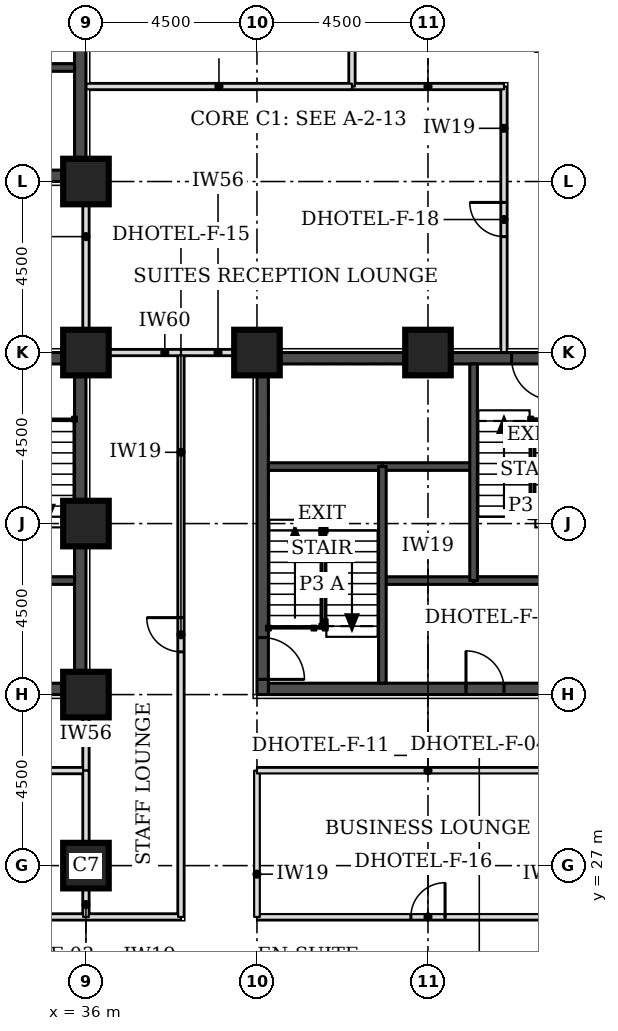
"""IFC4 building model, lengths in metres.
Left out: names, types, materials, properties, quantities, classifications, styles, units other than length and angle.
Written with IfcOpenShell. Run it as: python <this file> out.ifc"""

import sys

from ifc_helpers import new_model, si_unit, direction, frame, frame_2d, origin, origin_2d, place, context, subcontext, project, spatial, rectangle, extrude, element, fill, save


model = new_model("IFC4")
c1 = context("Model", 3, precision=1e-05, world=origin(), true_north=direction((0.0, 1.0)))
c2 = subcontext(c1, "Body", "Model", "MODEL_VIEW")
j1 = project(units=[si_unit("LENGTHUNIT", "METRE"), si_unit("PLANEANGLEUNIT", "RADIAN")], contexts=[c1])
p1 = place(None, origin())
s1 = spatial("IfcSite", under=j1, at=p1, CompositionType="ELEMENT")
p2 = place(p1, origin())
s2 = spatial("IfcBuilding", under=s1, at=p2, CompositionType="ELEMENT")
p3 = place(p2, frame((0.0, 0.0, 42.9)))
s3 = spatial("IfcBuildingStorey", under=s2, at=p3, CompositionType="ELEMENT", Elevation=42.9)
for number, where, z_axis, x_axis in (
    (1, (36.0, 27.0, 0.0), (0.0, 0.0, 1.0), (1.0, 0.0, 0.0)),
    (2, (36.0, 31.5, 0.0), (0.0, 0.0, 1.0), (1.0, 0.0, 0.0)),
    (3, (36.0, 36.0, 0.0), (0.0, 0.0, 1.0), (1.0, 0.0, 0.0)),
    (4, (36.0, 40.5, 0.0), (0.0, 0.0, 1.0), (1.0, 0.0, 0.0)),
    (5, (40.5, 40.5, 0.0), (0.0, 0.0, 1.0), (1.0, 0.0, 0.0)),
    (6, (45.0, 40.5, 0.0), (0.0, 0.0, 1.0), (1.0, 0.0, 0.0)),
    (7, (36.0, 45.0, 0.0), (0.0, 0.0, 1.0), (1.0, 0.0, 0.0)),
):
    element("IfcColumn", number, at=place(p3, frame(where, z_axis=z_axis, x_axis=x_axis)), inside=s3, PredefinedType="COLUMN", context=c2, shape_type="SweptSolid", body=[
        extrude(rectangle(XDim=1.2, YDim=1.2, at=origin_2d()), origin(), (0.0, 0.0, 1.0), 3.3),
    ])
p4 = place(p3, frame((27.3, 45.15, 0.0), z_axis=(0.0, 0.0, 1.0), x_axis=(1.0, 0.0, 0.0)))
e8 = element("IfcWall", 8, at=p4, inside=s3, PredefinedType="SHEAR", context=c2, shape_type="SweptSolid", body=[
    extrude(rectangle(XDim=8.4, YDim=0.3, at=frame_2d((4.2, 0.0))), origin(), (0.0, 0.0, 1.0), 3.3),
])
p5 = place(p4, frame((5.2, 0.0, 0.0)))
e9 = element("IfcOpeningElement", 9, at=p5, cuts=e8, PredefinedType="OPENING", context=c2, shape_type="SweptSolid", body=[
    extrude(rectangle(XDim=1.0, YDim=2.1, at=frame_2d((0.5, 1.05))), frame((0.0, 0.16, 0.0), z_axis=(0.0, -1.0, 0.0), x_axis=(1.0, 0.0, 0.0)), (0.0, 0.0, 1.0), 0.32),
])
p6 = place(p3, frame((35.85, 45.0, 0.0), z_axis=(0.0, 0.0, 1.0), x_axis=(0.0, 1.0, 0.0)))
e10 = element("IfcWall", 10, at=p6, inside=s3, PredefinedType="SHEAR", context=c2, shape_type="SweptSolid", body=[
    extrude(rectangle(XDim=9.0, YDim=0.3, at=frame_2d((4.5, 0.0))), origin(), (0.0, 0.0, 1.0), 3.3),
])
p7 = place(p3, frame((40.8, 31.65, 0.0), z_axis=(0.0, 0.0, 1.0), x_axis=(1.0, 0.0, 0.0)))
e11 = element("IfcWall", 11, at=p7, inside=s3, PredefinedType="SHEAR", context=c2, shape_type="SweptSolid", body=[
    extrude(rectangle(XDim=8.4, YDim=0.3, at=frame_2d((4.2, 0.0))), origin(), (0.0, 0.0, 1.0), 3.3),
])
p8 = place(p7, frame((5.2, 0.0, 0.0)))
e12 = element("IfcOpeningElement", 12, at=p8, cuts=e11, PredefinedType="OPENING", context=c2, shape_type="SweptSolid", body=[
    extrude(rectangle(XDim=1.0, YDim=2.1, at=frame_2d((0.5, 1.05))), frame((0.0, 0.16, 0.0), z_axis=(0.0, -1.0, 0.0), x_axis=(1.0, 0.0, 0.0)), (0.0, 0.0, 1.0), 0.32),
])
p9 = place(p3, frame((40.8, 40.35, 0.0), z_axis=(0.0, 0.0, 1.0), x_axis=(1.0, 0.0, 0.0)))
e13 = element("IfcWall", 13, at=p9, inside=s3, PredefinedType="SHEAR", context=c2, shape_type="SweptSolid", body=[
    extrude(rectangle(XDim=8.4, YDim=0.3, at=frame_2d((4.2, 0.0))), origin(), (0.0, 0.0, 1.0), 3.3),
])
p10 = place(p9, frame((6.4, 0.0, 0.0)))
e14 = element("IfcOpeningElement", 14, at=p10, cuts=e13, PredefinedType="OPENING", context=c2, shape_type="SweptSolid", body=[
    extrude(rectangle(XDim=1.1, YDim=2.1, at=frame_2d((0.55, 1.05))), frame((0.0, 0.16, 0.0), z_axis=(0.0, -1.0, 0.0), x_axis=(1.0, 0.0, 0.0)), (0.0, 0.0, 1.0), 0.32),
])
p11 = place(p3, frame((40.65, 31.5, 0.0), z_axis=(0.0, 0.0, 1.0), x_axis=(0.0, 1.0, 0.0)))
e15 = element("IfcWall", 15, at=p11, inside=s3, PredefinedType="SHEAR", context=c2, shape_type="SweptSolid", body=[
    extrude(rectangle(XDim=9.0, YDim=0.3, at=frame_2d((4.5, 0.0))), origin(), (0.0, 0.0, 1.0), 3.3),
])
p12 = place(p11, frame((0.4, 0.0, 0.0)))
e16 = element("IfcOpeningElement", 16, at=p12, cuts=e15, PredefinedType="OPENING", context=c2, shape_type="SweptSolid", body=[
    extrude(rectangle(XDim=1.1, YDim=2.1, at=frame_2d((0.55, 1.05))), frame((0.0, 0.16, 0.0), z_axis=(0.0, -1.0, 0.0), x_axis=(1.0, 0.0, 0.0)), (0.0, 0.0, 1.0), 0.32),
])
p13 = place(p3, frame((27.3, 31.65, 0.0), z_axis=(0.0, 0.0, 1.0), x_axis=(1.0, 0.0, 0.0)))
e17 = element("IfcWall", 17, at=p13, inside=s3, PredefinedType="SHEAR", context=c2, shape_type="SweptSolid", body=[
    extrude(rectangle(XDim=8.4, YDim=0.3, at=frame_2d((4.2, 0.0))), origin(), (0.0, 0.0, 1.0), 3.3),
])
p14 = place(p13, frame((4.8, 0.0, 0.0)))
e18 = element("IfcOpeningElement", 18, at=p14, cuts=e17, PredefinedType="OPENING", context=c2, shape_type="SweptSolid", body=[
    extrude(rectangle(XDim=1.8, YDim=2.1, at=frame_2d((0.9, 1.05))), frame((0.0, 0.16, 0.0), z_axis=(0.0, -1.0, 0.0), x_axis=(1.0, 0.0, 0.0)), (0.0, 0.0, 1.0), 0.32),
])
p15 = place(p3, frame((27.3, 40.35, 0.0), z_axis=(0.0, 0.0, 1.0), x_axis=(1.0, 0.0, 0.0)))
e19 = element("IfcWall", 19, at=p15, inside=s3, PredefinedType="SHEAR", context=c2, shape_type="SweptSolid", body=[
    extrude(rectangle(XDim=8.4, YDim=0.3, at=frame_2d((4.2, 0.0))), origin(), (0.0, 0.0, 1.0), 3.3),
])
p16 = place(p15, frame((6.4, 0.0, 0.0)))
e20 = element("IfcOpeningElement", 20, at=p16, cuts=e19, PredefinedType="OPENING", context=c2, shape_type="SweptSolid", body=[
    extrude(rectangle(XDim=1.1, YDim=2.1, at=frame_2d((0.55, 1.05))), frame((0.0, 0.16, 0.0), z_axis=(0.0, -1.0, 0.0), x_axis=(1.0, 0.0, 0.0)), (0.0, 0.0, 1.0), 0.32),
])
p17 = place(p3, frame((35.85, 31.5, 0.0), z_axis=(0.0, 0.0, 1.0), x_axis=(0.0, 1.0, 0.0)))
e21 = element("IfcWall", 21, at=p17, inside=s3, PredefinedType="SHEAR", context=c2, shape_type="SweptSolid", body=[
    extrude(rectangle(XDim=9.0, YDim=0.3, at=frame_2d((4.5, 0.0))), origin(), (0.0, 0.0, 1.0), 3.3),
])
p18 = place(p3, frame((27.0, 25.65, 0.0), z_axis=(0.0, 0.0, 1.0), x_axis=(1.0, 0.0, 0.0)))
e22 = element("IfcWall", 22, at=p18, inside=s3, PredefinedType="PARTITIONING", context=c2, shape_type="SweptSolid", body=[
    extrude(rectangle(XDim=11.5, YDim=0.15, at=frame_2d((5.75, 0.0))), origin(), (0.0, 0.0, 1.0), 3.08),
])
p19 = place(p3, frame((38.5, 25.65, 0.0), z_axis=(0.0, 0.0, 1.0), x_axis=(0.0, 1.0, 0.0)))
e23 = element("IfcWall", 23, at=p19, inside=s3, PredefinedType="PARTITIONING", context=c2, shape_type="SweptSolid", body=[
    extrude(rectangle(XDim=14.85, YDim=0.15, at=frame_2d((7.425, 0.0))), origin(), (0.0, 0.0, 1.0), 3.08),
])
p20 = place(p19, frame((6.975, 0.0, 0.0)))
e24 = element("IfcOpeningElement", 24, at=p20, cuts=e23, PredefinedType="OPENING", context=c2, shape_type="SweptSolid", body=[
    extrude(rectangle(XDim=0.9, YDim=2.1, at=frame_2d((0.45, 1.05))), frame((0.0, 0.085, 0.0), z_axis=(0.0, -1.0, 0.0), x_axis=(1.0, 0.0, 0.0)), (0.0, 0.0, 1.0), 0.17),
])
p21 = place(p3, frame((40.5, 25.65, 0.0), z_axis=(0.0, 0.0, 1.0), x_axis=(1.0, 0.0, 0.0)))
e25 = element("IfcWall", 25, at=p21, inside=s3, PredefinedType="PARTITIONING", context=c2, shape_type="SweptSolid", body=[
    extrude(rectangle(XDim=9.0, YDim=0.15, at=frame_2d((4.5, 0.0))), origin(), (0.0, 0.0, 1.0), 3.08),
])
p22 = place(p21, frame((4.05, 0.0, 0.0)))
e26 = element("IfcOpeningElement", 26, at=p22, cuts=e25, PredefinedType="OPENING", context=c2, shape_type="SweptSolid", body=[
    extrude(rectangle(XDim=0.9, YDim=2.1, at=frame_2d((0.45, 1.05))), frame((0.0, 0.085, 0.0), z_axis=(0.0, -1.0, 0.0), x_axis=(1.0, 0.0, 0.0)), (0.0, 0.0, 1.0), 0.17),
])
p23 = place(p3, frame((40.5, 25.65, 0.0), z_axis=(0.0, 0.0, 1.0), x_axis=(0.0, 1.0, 0.0)))
e27 = element("IfcWall", 27, at=p23, inside=s3, PredefinedType="PARTITIONING", context=c2, shape_type="SweptSolid", body=[
    extrude(rectangle(XDim=3.85, YDim=0.15, at=frame_2d((1.925, 0.0))), origin(), (0.0, 0.0, 1.0), 3.08),
])
p24 = place(p3, frame((27.0, 29.5, 0.0), z_axis=(0.0, 0.0, 1.0), x_axis=(1.0, 0.0, 0.0)))
e28 = element("IfcWall", 28, at=p24, inside=s3, PredefinedType="PARTITIONING", context=c2, shape_type="SweptSolid", body=[
    extrude(rectangle(XDim=9.0, YDim=0.15, at=frame_2d((4.5, 0.0))), origin(), (0.0, 0.0, 1.0), 3.08),
])
p25 = place(p24, frame((4.05, 0.0, 0.0)))
e29 = element("IfcOpeningElement", 29, at=p25, cuts=e28, PredefinedType="OPENING", context=c2, shape_type="SweptSolid", body=[
    extrude(rectangle(XDim=0.9, YDim=2.1, at=frame_2d((0.45, 1.05))), frame((0.0, 0.085, 0.0), z_axis=(0.0, -1.0, 0.0), x_axis=(1.0, 0.0, 0.0)), (0.0, 0.0, 1.0), 0.17),
])
p26 = place(p3, frame((36.0, 29.5, 0.0), z_axis=(0.0, 0.0, 1.0), x_axis=(0.0, 1.0, 0.0)))
e30 = element("IfcWall", 30, at=p26, inside=s3, PredefinedType="PARTITIONING", context=c2, shape_type="SweptSolid", body=[
    extrude(rectangle(XDim=1.95, YDim=0.15, at=frame_2d((0.975, 0.0))), origin(), (0.0, 0.0, 1.0), 2.33),
])
p27 = place(p3, frame((40.5, 29.5, 0.0), z_axis=(0.0, 0.0, 1.0), x_axis=(1.0, 0.0, 0.0)))
e31 = element("IfcWall", 31, at=p27, inside=s3, PredefinedType="PARTITIONING", context=c2, shape_type="SweptSolid", body=[
    extrude(rectangle(XDim=9.0, YDim=0.15, at=frame_2d((4.5, 0.0))), origin(), (0.0, 0.0, 1.0), 3.08),
])
p28 = place(p3, frame((38.5, 40.5, 0.0), z_axis=(0.0, 0.0, 1.0), x_axis=(1.0, 0.0, 0.0)))
e32 = element("IfcWall", 32, at=p28, inside=s3, PredefinedType="PARTITIONING", context=c2, shape_type="SweptSolid", body=[
    extrude(rectangle(XDim=1.95, YDim=0.15, at=frame_2d((0.975, 0.0))), origin(), (0.0, 0.0, 1.0), 2.33),
])
p29 = place(p3, frame((36.0, 40.55, 0.0), z_axis=(0.0, 0.0, 1.0), x_axis=(0.0, 1.0, 0.0)))
e33 = element("IfcWall", 33, at=p29, inside=s3, PredefinedType="PARTITIONING", context=c2, shape_type="SweptSolid", body=[
    extrude(rectangle(XDim=4.4, YDim=0.15, at=frame_2d((2.2, 0.0))), origin(), (0.0, 0.0, 1.0), 2.33),
])
p30 = place(p3, frame((47.0, 40.5, 0.0), z_axis=(0.0, 0.0, 1.0), x_axis=(0.0, 1.0, 0.0)))
e34 = element("IfcWall", 34, at=p30, inside=s3, PredefinedType="PARTITIONING", context=c2, shape_type="SweptSolid", body=[
    extrude(rectangle(XDim=7.0, YDim=0.15, at=frame_2d((3.5, 0.0))), origin(), (0.0, 0.0, 1.0), 3.08),
])
p31 = place(p30, frame((3.05, 0.0, 0.0)))
e35 = element("IfcOpeningElement", 35, at=p31, cuts=e34, PredefinedType="OPENING", context=c2, shape_type="SweptSolid", body=[
    extrude(rectangle(XDim=0.9, YDim=2.1, at=frame_2d((0.45, 1.05))), frame((0.0, 0.085, 0.0), z_axis=(0.0, -1.0, 0.0), x_axis=(1.0, 0.0, 0.0)), (0.0, 0.0, 1.0), 0.17),
])
p32 = place(p3, frame((43.0, 47.5, 0.0), z_axis=(0.0, 0.0, 1.0), x_axis=(1.0, 0.0, 0.0)))
e36 = element("IfcWall", 36, at=p32, inside=s3, PredefinedType="PARTITIONING", context=c2, shape_type="SweptSolid", body=[
    extrude(rectangle(XDim=4.0, YDim=0.15, at=frame_2d((2.0, 0.0))), origin(), (0.0, 0.0, 1.0), 3.08),
])
p33 = place(p3, frame((43.0, 47.5, 0.0), z_axis=(0.0, 0.0, 1.0), x_axis=(0.0, 1.0, 0.0)))
e37 = element("IfcWall", 37, at=p33, inside=s3, PredefinedType="PARTITIONING", context=c2, shape_type="SweptSolid", body=[
    extrude(rectangle(XDim=7.85, YDim=0.15, at=frame_2d((3.925, 0.0))), origin(), (0.0, 0.0, 1.0), 3.08),
])
p34 = place(p33, frame((3.475, 0.0, 0.0)))
e38 = element("IfcOpeningElement", 38, at=p34, cuts=e37, PredefinedType="OPENING", context=c2, shape_type="SweptSolid", body=[
    extrude(rectangle(XDim=0.9, YDim=2.1, at=frame_2d((0.45, 1.05))), frame((0.0, 0.085, 0.0), z_axis=(0.0, -1.0, 0.0), x_axis=(1.0, 0.0, 0.0)), (0.0, 0.0, 1.0), 0.17),
])
p35 = place(p3, frame((36.0, 25.65, 0.0), z_axis=(0.0, 0.0, 1.0), x_axis=(0.0, 1.0, 0.0)))
e39 = element("IfcWall", 39, at=p35, inside=s3, PredefinedType="PARTITIONING", context=c2, shape_type="SweptSolid", body=[
    extrude(rectangle(XDim=3.85, YDim=0.15, at=frame_2d((1.925, 0.0))), origin(), (0.0, 0.0, 1.0), 2.33),
])
p36 = place(p3, frame((36.05, 40.5, 0.0), z_axis=(0.0, 0.0, 1.0), x_axis=(1.0, 0.0, 0.0)))
e40 = element("IfcWall", 40, at=p36, inside=s3, PredefinedType="PARTITIONING", context=c2, shape_type="SweptSolid", body=[
    extrude(rectangle(XDim=2.45, YDim=0.15, at=frame_2d((1.225, 0.0))), origin(), (0.0, 0.0, 1.0), 2.33),
])
p37 = place(p3, frame((36.0, 47.5, 0.0), z_axis=(0.0, 0.0, 1.0), x_axis=(1.0, 0.0, 0.0)))
e41 = element("IfcWall", 41, at=p37, inside=s3, PredefinedType="PARTITIONING", context=c2, shape_type="SweptSolid", body=[
    extrude(rectangle(XDim=7.0, YDim=0.15, at=frame_2d((3.5, 0.0))), origin(), (0.0, 0.0, 1.0), 3.08),
])
p38 = place(p3, frame((32.7, 48.0, 0.0), z_axis=(0.0, 0.0, 1.0), x_axis=(1.0, 0.0, 0.0)))
e42 = element("IfcWall", 42, at=p38, inside=s3, PredefinedType="SOLIDWALL", context=c2, shape_type="SweptSolid", body=[
    extrude(rectangle(XDim=3.0, YDim=0.2, at=frame_2d((1.5, 0.0))), origin(), (0.0, 0.0, 1.0), 3.08),
])
p39 = place(p3, frame((43.8, 34.5, 0.0), z_axis=(0.0, 0.0, 1.0), x_axis=(1.0, 0.0, 0.0)))
e43 = element("IfcWall", 43, at=p39, inside=s3, PredefinedType="SOLIDWALL", context=c2, shape_type="SweptSolid", body=[
    extrude(rectangle(XDim=2.4, YDim=0.2, at=frame_2d((1.2, 0.0))), origin(), (0.0, 0.0, 1.0), 3.08),
])
p40 = place(p3, frame((46.2, 34.5, 0.0), z_axis=(0.0, 0.0, 1.0), x_axis=(1.0, 0.0, 0.0)))
e44 = element("IfcWall", 44, at=p40, inside=s3, PredefinedType="SOLIDWALL", context=c2, shape_type="SweptSolid", body=[
    extrude(rectangle(XDim=3.0, YDim=0.2, at=frame_2d((1.5, 0.0))), origin(), (0.0, 0.0, 1.0), 3.08),
])
p41 = place(p3, frame((43.8, 37.5, 0.0), z_axis=(0.0, 0.0, 1.0), x_axis=(1.0, 0.0, 0.0)))
e45 = element("IfcWall", 45, at=p41, inside=s3, PredefinedType="SOLIDWALL", context=c2, shape_type="SweptSolid", body=[
    extrude(rectangle(XDim=2.4, YDim=0.2, at=frame_2d((1.2, 0.0))), origin(), (0.0, 0.0, 1.0), 3.3),
])
p42 = place(p3, frame((40.8, 37.5, 0.0), z_axis=(0.0, 0.0, 1.0), x_axis=(1.0, 0.0, 0.0)))
e46 = element("IfcWall", 46, at=p42, inside=s3, PredefinedType="SOLIDWALL", context=c2, shape_type="SweptSolid", body=[
    extrude(rectangle(XDim=3.0, YDim=0.2, at=frame_2d((1.5, 0.0))), origin(), (0.0, 0.0, 1.0), 3.08),
])
for number, where, z_axis, x_axis in (
    (47, (43.8, 31.8, 0.0), (0.0, 0.0, 1.0), (0.0, 1.0, 0.0)),
    (48, (46.2, 34.5, 0.0), (0.0, 0.0, 1.0), (0.0, 1.0, 0.0)),
):
    element("IfcWall", number, at=place(p3, frame(where, z_axis=z_axis, x_axis=x_axis)), inside=s3, PredefinedType="SOLIDWALL", context=c2, shape_type="SweptSolid", body=[
        extrude(rectangle(XDim=5.7, YDim=0.2, at=frame_2d((2.85, 0.0))), origin(), (0.0, 0.0, 1.0), 3.08),
    ])
p43 = place(p3, frame((30.3, 34.5, 0.0), z_axis=(0.0, 0.0, 1.0), x_axis=(1.0, 0.0, 0.0)))
e49 = element("IfcWall", 49, at=p43, inside=s3, PredefinedType="SOLIDWALL", context=c2, shape_type="SweptSolid", body=[
    extrude(rectangle(XDim=5.4, YDim=0.2, at=frame_2d((2.7, 0.0))), origin(), (0.0, 0.0, 1.0), 3.08),
])
p44 = place(p43, frame((0.45, 0.0, 0.0)))
e50 = element("IfcOpeningElement", 50, at=p44, cuts=e49, PredefinedType="OPENING", context=c2, shape_type="SweptSolid", body=[
    extrude(rectangle(XDim=1.5, YDim=2.1, at=frame_2d((0.75, 1.05))), frame((0.0, 0.11, 0.0), z_axis=(0.0, -1.0, 0.0), x_axis=(1.0, 0.0, 0.0)), (0.0, 0.0, 1.0), 0.22),
])
p45 = place(p20, origin())
e51 = element("IfcDoor", 51, at=p45, inside=s3, OperationType="SINGLE_SWING_RIGHT", PredefinedType="DOOR", context=c2, shape_type="SweptSolid", body=[
    extrude(rectangle(XDim=0.9, YDim=2.1, at=frame_2d((0.45, 1.05))), frame((0.0, 0.025, 0.0), z_axis=(0.0, -1.0, 0.0), x_axis=(1.0, 0.0, 0.0)), (0.0, 0.0, 1.0), 0.05),
])
fill(e24, e51)
p46 = place(p31, origin())
e52 = element("IfcDoor", 52, at=p46, inside=s3, OperationType="SINGLE_SWING_RIGHT", PredefinedType="DOOR", context=c2, shape_type="SweptSolid", body=[
    extrude(rectangle(XDim=0.9, YDim=2.1, at=frame_2d((0.45, 1.05))), frame((0.0, 0.025, 0.0), z_axis=(0.0, -1.0, 0.0), x_axis=(1.0, 0.0, 0.0)), (0.0, 0.0, 1.0), 0.05),
])
fill(e35, e52)
p47 = place(p22, origin())
e53 = element("IfcDoor", 53, at=p47, inside=s3, OperationType="SINGLE_SWING_RIGHT", PredefinedType="DOOR", context=c2, shape_type="SweptSolid", body=[
    extrude(rectangle(XDim=0.9, YDim=2.1, at=frame_2d((0.45, 1.05))), frame((0.0, 0.025, 0.0), z_axis=(0.0, -1.0, 0.0), x_axis=(1.0, 0.0, 0.0)), (0.0, 0.0, 1.0), 0.05),
])
fill(e26, e53)
p48 = place(p12, frame((1.1, 0.0, 0.0), z_axis=(0.0, 0.0, 1.0), x_axis=(-1.0, 0.0, 0.0)))
e54 = element("IfcDoor", 54, at=p48, inside=s3, OperationType="SINGLE_SWING_RIGHT", PredefinedType="DOOR", context=c2, shape_type="SweptSolid", body=[
    extrude(rectangle(XDim=1.1, YDim=2.1, at=frame_2d((0.55, 1.05))), frame((0.0, 0.025, 0.0), z_axis=(0.0, -1.0, 0.0), x_axis=(1.0, 0.0, 0.0)), (0.0, 0.0, 1.0), 0.05),
])
fill(e16, e54)
p49 = place(p10, frame((1.1, 0.0, 0.0), z_axis=(0.0, 0.0, 1.0), x_axis=(-1.0, 0.0, 0.0)))
e55 = element("IfcDoor", 55, at=p49, inside=s3, OperationType="SINGLE_SWING_LEFT", PredefinedType="DOOR", context=c2, shape_type="SweptSolid", body=[
    extrude(rectangle(XDim=1.1, YDim=2.1, at=frame_2d((0.55, 1.05))), frame((0.0, 0.025, 0.0), z_axis=(0.0, -1.0, 0.0), x_axis=(1.0, 0.0, 0.0)), (0.0, 0.0, 1.0), 0.05),
])
fill(e14, e55)
p50 = place(p8, origin())
e56 = element("IfcDoor", 56, at=p50, inside=s3, OperationType="SINGLE_SWING_LEFT", PredefinedType="DOOR", context=c2, shape_type="SweptSolid", body=[
    extrude(rectangle(XDim=1.0, YDim=2.1, at=frame_2d((0.5, 1.05))), frame((0.0, 0.025, 0.0), z_axis=(0.0, -1.0, 0.0), x_axis=(1.0, 0.0, 0.0)), (0.0, 0.0, 1.0), 0.05),
])
fill(e12, e56)
save(model, sys.argv[1])
